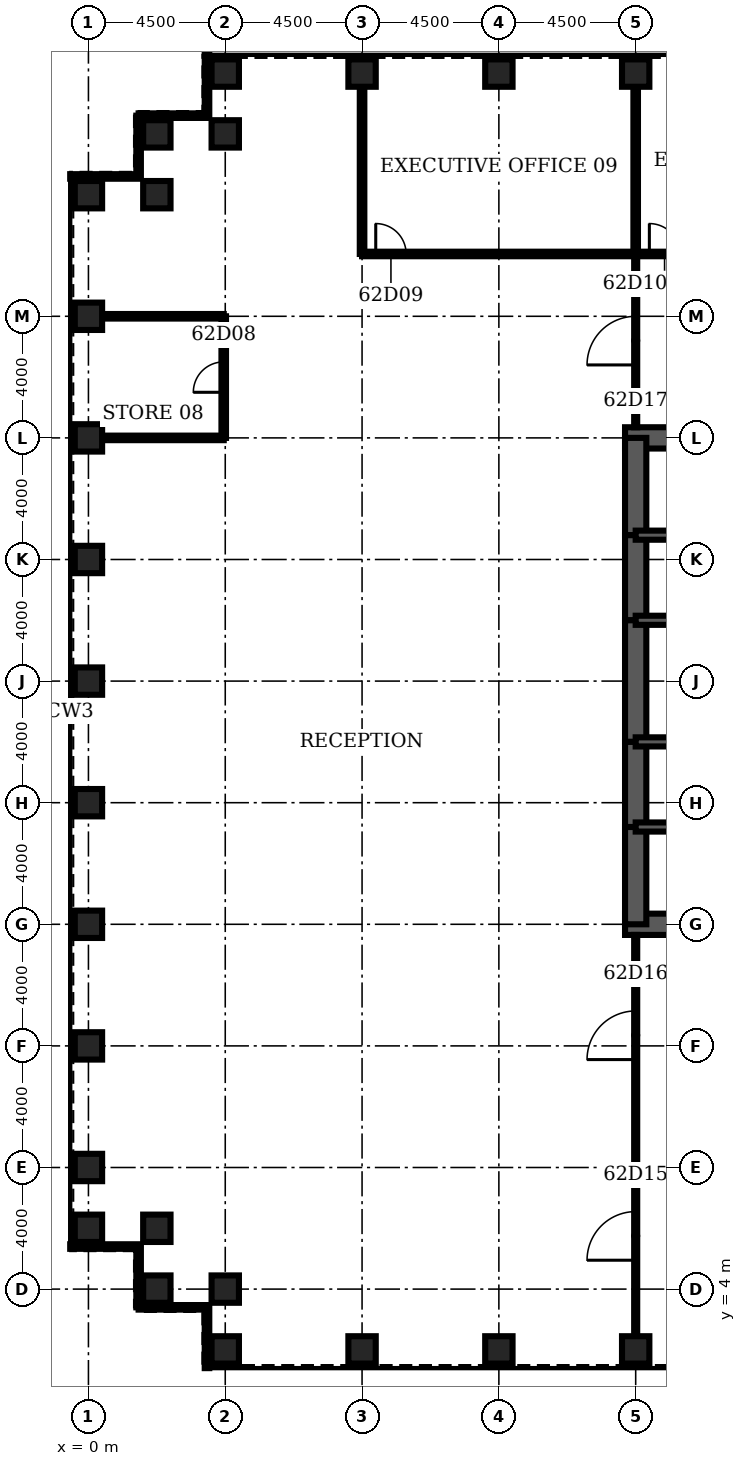
"""IFC4 building model, lengths in metres.
Left out: names, types, materials, properties, quantities, classifications, styles, units other than length and angle.
Written with IfcOpenShell. Run it as: python <this file> out.ifc"""

import sys

from ifc_helpers import new_model, si_unit, direction, frame, frame_2d, origin, origin_2d, place, context, subcontext, project, spatial, rectangle, hollow_rectangle, extrude, element, fill, save


model = new_model("IFC4")
c1 = context("Model", 3, precision=1e-05, world=origin(), true_north=direction((0.0, 1.0)))
c2 = subcontext(c1, "Body", "Model", "MODEL_VIEW")
j1 = project(units=[si_unit("LENGTHUNIT", "METRE"), si_unit("PLANEANGLEUNIT", "RADIAN")], contexts=[c1])
p1 = place(None, origin())
s1 = spatial("IfcSite", under=j1, at=p1, CompositionType="ELEMENT")
p2 = place(p1, origin())
s2 = spatial("IfcBuilding", under=s1, at=p2, CompositionType="ELEMENT")
p3 = place(p2, frame((0.0, 0.0, 275.3)))
s3 = spatial("IfcBuildingStorey", under=s2, at=p3, CompositionType="ELEMENT", Elevation=275.3)
for number, where, z_axis, x_axis in (
    (1, (4.5, 2.0, 0.0), (0.0, 0.0, 1.0), (0.0, 1.0, 0.0)),
    (2, (9.0, 2.0, 0.0), (0.0, 0.0, 1.0), (0.0, 1.0, 0.0)),
    (3, (13.5, 2.0, 0.0), (0.0, 0.0, 1.0), (0.0, 1.0, 0.0)),
    (4, (18.0, 2.0, 0.0), (0.0, 0.0, 1.0), (0.0, 1.0, 0.0)),
    (5, (18.0, 44.0, 0.0), (0.0, 0.0, 1.0), (0.0, 1.0, 0.0)),
    (6, (13.5, 44.0, 0.0), (0.0, 0.0, 1.0), (0.0, 1.0, 0.0)),
    (7, (9.0, 44.0, 0.0), (0.0, 0.0, 1.0), (0.0, 1.0, 0.0)),
    (8, (4.5, 44.0, 0.0), (0.0, 0.0, 1.0), (0.0, 1.0, 0.0)),
    (9, (4.5, 42.0, 0.0), (0.0, 0.0, 1.0), (0.0, 1.0, 0.0)),
    (10, (2.25, 42.0, 0.0), (0.0, 0.0, 1.0), (1.0, 0.0, 0.0)),
    (11, (2.25, 40.0, 0.0), (0.0, 0.0, 1.0), (1.0, 0.0, 0.0)),
    (12, (0.0, 40.0, 0.0), (0.0, 0.0, 1.0), (1.0, 0.0, 0.0)),
    (13, (0.0, 36.0, 0.0), (0.0, 0.0, 1.0), (1.0, 0.0, 0.0)),
    (14, (0.0, 32.0, 0.0), (0.0, 0.0, 1.0), (1.0, 0.0, 0.0)),
    (15, (0.0, 28.0, 0.0), (0.0, 0.0, 1.0), (1.0, 0.0, 0.0)),
    (16, (0.0, 24.0, 0.0), (0.0, 0.0, 1.0), (1.0, 0.0, 0.0)),
    (17, (0.0, 20.0, 0.0), (0.0, 0.0, 1.0), (1.0, 0.0, 0.0)),
    (18, (0.0, 16.0, 0.0), (0.0, 0.0, 1.0), (1.0, 0.0, 0.0)),
    (19, (0.0, 12.0, 0.0), (0.0, 0.0, 1.0), (1.0, 0.0, 0.0)),
    (20, (0.0, 8.0, 0.0), (0.0, 0.0, 1.0), (1.0, 0.0, 0.0)),
    (21, (0.0, 6.0, 0.0), (0.0, 0.0, 1.0), (1.0, 0.0, 0.0)),
    (22, (2.25, 6.0, 0.0), (0.0, 0.0, 1.0), (1.0, 0.0, 0.0)),
    (23, (2.25, 4.0, 0.0), (0.0, 0.0, 1.0), (1.0, 0.0, 0.0)),
    (24, (4.5, 4.0, 0.0), (0.0, 0.0, 1.0), (0.0, 1.0, 0.0)),
):
    element("IfcColumn", number, at=place(p3, frame(where, z_axis=z_axis, x_axis=x_axis)), inside=s3, PredefinedType="COLUMN", context=c2, shape_type="SweptSolid", body=[
        extrude(hollow_rectangle(XDim=0.9, YDim=0.9, WallThickness=0.07, at=origin_2d()), origin(), (0.0, 0.0, 1.0), 4.2),
    ])
for number, where, z_axis, x_axis in (
    (25, (17.65, 16.0, 0.0), (0.0, 0.0, 1.0), (1.0, 0.0, 0.0)),
    (26, (27.0, 32.0, 0.0), (0.0, 0.0, 1.0), (-1.0, 0.0, 0.0)),
):
    element("IfcWall", number, at=place(p3, frame(where, z_axis=z_axis, x_axis=x_axis)), inside=s3, PredefinedType="SHEAR", context=c2, shape_type="SweptSolid", body=[
        extrude(rectangle(XDim=9.35, YDim=0.7, at=frame_2d((4.675, 0.0))), origin(), (0.0, 0.0, 1.0), 4.2),
    ])
p4 = place(p3, frame((18.0, 32.0, 0.0), z_axis=(0.0, 0.0, 1.0), x_axis=(0.0, -1.0, 0.0)))
e27 = element("IfcWall", 27, at=p4, inside=s3, PredefinedType="SHEAR", context=c2, shape_type="SweptSolid", body=[
    extrude(rectangle(XDim=3.2, YDim=0.7, at=frame_2d((1.6, 0.0))), origin(), (0.0, 0.0, 1.0), 4.2),
])
p5 = place(p3, frame((18.0, 28.8, 0.0), z_axis=(0.0, 0.0, 1.0), x_axis=(0.0, -1.0, 0.0)))
e28 = element("IfcWall", 28, at=p5, inside=s3, PredefinedType="SHEAR", context=c2, shape_type="SweptSolid", body=[
    extrude(rectangle(XDim=2.8, YDim=0.7, at=frame_2d((1.4, 0.0))), origin(), (0.0, 0.0, 1.0), 4.2),
])
p6 = place(p5, frame((0.4, 0.0, 0.0)))
e29 = element("IfcOpeningElement", 29, at=p6, cuts=e28, PredefinedType="OPENING", context=c2, shape_type="SweptSolid", body=[
    extrude(rectangle(XDim=1.8, YDim=2.1, at=frame_2d((0.9, 1.05))), frame((0.0, 0.36, 0.0), z_axis=(0.0, -1.0, 0.0), x_axis=(1.0, 0.0, 0.0)), (0.0, 0.0, 1.0), 0.72),
])
p7 = place(p3, frame((18.0, 26.0, 0.0), z_axis=(0.0, 0.0, 1.0), x_axis=(0.0, -1.0, 0.0)))
e30 = element("IfcWall", 30, at=p7, inside=s3, PredefinedType="SHEAR", context=c2, shape_type="SweptSolid", body=[
    extrude(rectangle(XDim=4.0, YDim=0.7, at=frame_2d((2.0, 0.0))), origin(), (0.0, 0.0, 1.0), 4.2),
])
p8 = place(p3, frame((18.0, 22.0, 0.0), z_axis=(0.0, 0.0, 1.0), x_axis=(0.0, -1.0, 0.0)))
e31 = element("IfcWall", 31, at=p8, inside=s3, PredefinedType="SHEAR", context=c2, shape_type="SweptSolid", body=[
    extrude(rectangle(XDim=2.8, YDim=0.7, at=frame_2d((1.4, 0.0))), origin(), (0.0, 0.0, 1.0), 4.2),
])
p9 = place(p8, frame((0.6, 0.0, 0.0)))
e32 = element("IfcOpeningElement", 32, at=p9, cuts=e31, PredefinedType="OPENING", context=c2, shape_type="SweptSolid", body=[
    extrude(rectangle(XDim=1.8, YDim=2.1, at=frame_2d((0.9, 1.05))), frame((0.0, 0.36, 0.0), z_axis=(0.0, -1.0, 0.0), x_axis=(1.0, 0.0, 0.0)), (0.0, 0.0, 1.0), 0.72),
])
p10 = place(p3, frame((18.0, 19.2, 0.0), z_axis=(0.0, 0.0, 1.0), x_axis=(0.0, -1.0, 0.0)))
e33 = element("IfcWall", 33, at=p10, inside=s3, PredefinedType="SHEAR", context=c2, shape_type="SweptSolid", body=[
    extrude(rectangle(XDim=3.2, YDim=0.7, at=frame_2d((1.6, 0.0))), origin(), (0.0, 0.0, 1.0), 4.2),
])
p11 = place(p3, frame((18.0, 19.2, 0.0), z_axis=(0.0, 0.0, 1.0), x_axis=(1.0, 0.0, 0.0)))
e34 = element("IfcWall", 34, at=p11, inside=s3, PredefinedType="SOLIDWALL", context=c2, shape_type="SweptSolid", body=[
    extrude(rectangle(XDim=9.0, YDim=0.3, at=frame_2d((4.5, 0.0))), origin(), (0.0, 0.0, 1.0), 4.2),
])
p12 = place(p11, frame((0.65, 0.0, 0.0)))
e35 = element("IfcOpeningElement", 35, at=p12, cuts=e34, PredefinedType="OPENING", context=c2, shape_type="SweptSolid", body=[
    extrude(rectangle(XDim=1.0, YDim=2.1, at=frame_2d((0.5, 1.05))), frame((0.0, 0.16, 0.0), z_axis=(0.0, -1.0, 0.0), x_axis=(1.0, 0.0, 0.0)), (0.0, 0.0, 1.0), 0.32),
])
p13 = place(p3, frame((18.0, 28.8, 0.0), z_axis=(0.0, 0.0, 1.0), x_axis=(1.0, 0.0, 0.0)))
e36 = element("IfcWall", 36, at=p13, inside=s3, PredefinedType="SOLIDWALL", context=c2, shape_type="SweptSolid", body=[
    extrude(rectangle(XDim=9.0, YDim=0.3, at=frame_2d((4.5, 0.0))), origin(), (0.0, 0.0, 1.0), 4.2),
])
p14 = place(p13, frame((0.65, 0.0, 0.0)))
e37 = element("IfcOpeningElement", 37, at=p14, cuts=e36, PredefinedType="OPENING", context=c2, shape_type="SweptSolid", body=[
    extrude(rectangle(XDim=1.0, YDim=2.1, at=frame_2d((0.5, 1.05))), frame((0.0, 0.16, 0.0), z_axis=(0.0, -1.0, 0.0), x_axis=(1.0, 0.0, 0.0)), (0.0, 0.0, 1.0), 0.32),
])
p15 = place(p3, frame((18.0, 22.0, 0.0), z_axis=(0.0, 0.0, 1.0), x_axis=(1.0, 0.0, 0.0)))
e38 = element("IfcWall", 38, at=p15, inside=s3, PredefinedType="SOLIDWALL", context=c2, shape_type="SweptSolid", body=[
    extrude(rectangle(XDim=6.0, YDim=0.3, at=frame_2d((3.0, 0.0))), origin(), (0.0, 0.0, 1.0), 4.2),
])
p16 = place(p15, frame((4.4, 0.0, 0.0)))
e39 = element("IfcOpeningElement", 39, at=p16, cuts=e38, PredefinedType="OPENING", context=c2, shape_type="SweptSolid", body=[
    extrude(rectangle(XDim=1.0, YDim=2.1, at=frame_2d((0.5, 1.05))), frame((0.0, 0.16, 0.0), z_axis=(0.0, -1.0, 0.0), x_axis=(1.0, 0.0, 0.0)), (0.0, 0.0, 1.0), 0.32),
])
p17 = place(p15, frame((0.9, 0.0, 0.0)))
e40 = element("IfcOpeningElement", 40, at=p17, cuts=e38, PredefinedType="OPENING", context=c2, shape_type="SweptSolid", body=[
    extrude(rectangle(XDim=1.0, YDim=2.1, at=frame_2d((0.5, 1.05))), frame((0.0, 0.16, 0.0), z_axis=(0.0, -1.0, 0.0), x_axis=(1.0, 0.0, 0.0)), (0.0, 0.0, 1.0), 0.32),
])
p18 = place(p3, frame((18.0, 26.0, 0.0), z_axis=(0.0, 0.0, 1.0), x_axis=(1.0, 0.0, 0.0)))
e41 = element("IfcWall", 41, at=p18, inside=s3, PredefinedType="SOLIDWALL", context=c2, shape_type="SweptSolid", body=[
    extrude(rectangle(XDim=6.0, YDim=0.3, at=frame_2d((3.0, 0.0))), origin(), (0.0, 0.0, 1.0), 4.2),
])
for number, where, z_axis, x_axis in (
    (42, (0.45, 32.0, 0.0), (0.0, 0.0, 1.0), (1.0, 0.0, 0.0)),
    (43, (0.45, 36.0, 0.0), (0.0, 0.0, 1.0), (1.0, 0.0, 0.0)),
):
    element("IfcWall", number, at=place(p3, frame(where, z_axis=z_axis, x_axis=x_axis)), inside=s3, PredefinedType="PARTITIONING", context=c2, shape_type="SweptSolid", body=[
        extrude(rectangle(XDim=4.0, YDim=0.15, at=frame_2d((2.0, 0.0))), origin(), (0.0, 0.0, 1.0), 3.0),
    ])
p19 = place(p3, frame((9.0, 38.05, 0.0), z_axis=(0.0, 0.0, 1.0), x_axis=(1.0, 0.0, 0.0)))
e44 = element("IfcWall", 44, at=p19, inside=s3, PredefinedType="PARTITIONING", context=c2, shape_type="SweptSolid", body=[
    extrude(rectangle(XDim=54.0, YDim=0.15, at=frame_2d((27.0, 0.0))), origin(), (0.0, 0.0, 1.0), 3.0),
])
p20 = place(p19, frame((0.45, 0.0, 0.0)))
e45 = element("IfcOpeningElement", 45, at=p20, cuts=e44, PredefinedType="OPENING", context=c2, shape_type="SweptSolid", body=[
    extrude(rectangle(XDim=1.0, YDim=2.1, at=frame_2d((0.5, 1.05))), frame((0.0, 0.085, 0.0), z_axis=(0.0, -1.0, 0.0), x_axis=(1.0, 0.0, 0.0)), (0.0, 0.0, 1.0), 0.17),
])
p21 = place(p19, frame((9.45, 0.0, 0.0)))
e46 = element("IfcOpeningElement", 46, at=p21, cuts=e44, PredefinedType="OPENING", context=c2, shape_type="SweptSolid", body=[
    extrude(rectangle(XDim=1.0, YDim=2.1, at=frame_2d((0.5, 1.05))), frame((0.0, 0.085, 0.0), z_axis=(0.0, -1.0, 0.0), x_axis=(1.0, 0.0, 0.0)), (0.0, 0.0, 1.0), 0.17),
])
p22 = place(p19, frame((18.45, 0.0, 0.0)))
e47 = element("IfcOpeningElement", 47, at=p22, cuts=e44, PredefinedType="OPENING", context=c2, shape_type="SweptSolid", body=[
    extrude(rectangle(XDim=1.0, YDim=2.1, at=frame_2d((0.5, 1.05))), frame((0.0, 0.085, 0.0), z_axis=(0.0, -1.0, 0.0), x_axis=(1.0, 0.0, 0.0)), (0.0, 0.0, 1.0), 0.17),
])
p23 = place(p19, frame((27.45, 0.0, 0.0)))
e48 = element("IfcOpeningElement", 48, at=p23, cuts=e44, PredefinedType="OPENING", context=c2, shape_type="SweptSolid", body=[
    extrude(rectangle(XDim=1.0, YDim=2.1, at=frame_2d((0.5, 1.05))), frame((0.0, 0.085, 0.0), z_axis=(0.0, -1.0, 0.0), x_axis=(1.0, 0.0, 0.0)), (0.0, 0.0, 1.0), 0.17),
])
p24 = place(p19, frame((36.45, 0.0, 0.0)))
e49 = element("IfcOpeningElement", 49, at=p24, cuts=e44, PredefinedType="OPENING", context=c2, shape_type="SweptSolid", body=[
    extrude(rectangle(XDim=1.0, YDim=2.1, at=frame_2d((0.5, 1.05))), frame((0.0, 0.085, 0.0), z_axis=(0.0, -1.0, 0.0), x_axis=(1.0, 0.0, 0.0)), (0.0, 0.0, 1.0), 0.17),
])
p25 = place(p19, frame((45.45, 0.0, 0.0)))
e50 = element("IfcOpeningElement", 50, at=p25, cuts=e44, PredefinedType="OPENING", context=c2, shape_type="SweptSolid", body=[
    extrude(rectangle(XDim=1.0, YDim=2.1, at=frame_2d((0.5, 1.05))), frame((0.0, 0.085, 0.0), z_axis=(0.0, -1.0, 0.0), x_axis=(1.0, 0.0, 0.0)), (0.0, 0.0, 1.0), 0.17),
])
p26 = place(p3, frame((4.45, 32.0, 0.0), z_axis=(0.0, 0.0, 1.0), x_axis=(0.0, 1.0, 0.0)))
e51 = element("IfcWall", 51, at=p26, inside=s3, PredefinedType="PARTITIONING", context=c2, shape_type="SweptSolid", body=[
    extrude(rectangle(XDim=4.0, YDim=0.15, at=frame_2d((2.0, 0.0))), origin(), (0.0, 0.0, 1.0), 3.0),
])
p27 = place(p26, frame((1.5, 0.0, 0.0)))
e52 = element("IfcOpeningElement", 52, at=p27, cuts=e51, PredefinedType="OPENING", context=c2, shape_type="SweptSolid", body=[
    extrude(rectangle(XDim=1.0, YDim=2.1, at=frame_2d((0.5, 1.05))), frame((0.0, 0.085, 0.0), z_axis=(0.0, -1.0, 0.0), x_axis=(1.0, 0.0, 0.0)), (0.0, 0.0, 1.0), 0.17),
])
p28 = place(p3, frame((9.0, 38.05, 0.0), z_axis=(0.0, 0.0, 1.0), x_axis=(0.0, 1.0, 0.0)))
e53 = element("IfcWall", 53, at=p28, inside=s3, PredefinedType="PARTITIONING", context=c2, shape_type="SweptSolid", body=[
    extrude(rectangle(XDim=5.5, YDim=0.15, at=frame_2d((2.75, 0.0))), origin(), (0.0, 0.0, 1.0), 3.0),
])
p29 = place(p3, frame((18.0, 2.45, 0.0), z_axis=(0.0, 0.0, 1.0), x_axis=(0.0, 1.0, 0.0)))
e54 = element("IfcWall", 54, at=p29, inside=s3, PredefinedType="PARTITIONING", context=c2, shape_type="SweptSolid", body=[
    extrude(rectangle(XDim=13.2, YDim=0.1, at=frame_2d((6.6, 0.0))), origin(), (0.0, 0.0, 1.0), 3.0),
])
p30 = place(p29, frame((2.5, 0.0, 0.0)))
e55 = element("IfcOpeningElement", 55, at=p30, cuts=e54, PredefinedType="OPENING", context=c2, shape_type="SweptSolid", body=[
    extrude(rectangle(XDim=1.6, YDim=2.1, at=frame_2d((0.8, 1.05))), frame((0.0, 0.06, 0.0), z_axis=(0.0, -1.0, 0.0), x_axis=(1.0, 0.0, 0.0)), (0.0, 0.0, 1.0), 0.12),
])
p31 = place(p29, frame((9.1, 0.0, 0.0)))
e56 = element("IfcOpeningElement", 56, at=p31, cuts=e54, PredefinedType="OPENING", context=c2, shape_type="SweptSolid", body=[
    extrude(rectangle(XDim=1.6, YDim=2.1, at=frame_2d((0.8, 1.05))), frame((0.0, 0.06, 0.0), z_axis=(0.0, -1.0, 0.0), x_axis=(1.0, 0.0, 0.0)), (0.0, 0.0, 1.0), 0.12),
])
p32 = place(p3, frame((18.0, 32.35, 0.0), z_axis=(0.0, 0.0, 1.0), x_axis=(0.0, 1.0, 0.0)))
e57 = element("IfcWall", 57, at=p32, inside=s3, PredefinedType="PARTITIONING", context=c2, shape_type="SweptSolid", body=[
    extrude(rectangle(XDim=5.7, YDim=0.1, at=frame_2d((2.85, 0.0))), origin(), (0.0, 0.0, 1.0), 3.0),
])
p33 = place(p32, frame((2.05, 0.0, 0.0)))
e58 = element("IfcOpeningElement", 58, at=p33, cuts=e57, PredefinedType="OPENING", context=c2, shape_type="SweptSolid", body=[
    extrude(rectangle(XDim=1.6, YDim=2.1, at=frame_2d((0.8, 1.05))), frame((0.0, 0.06, 0.0), z_axis=(0.0, -1.0, 0.0), x_axis=(1.0, 0.0, 0.0)), (0.0, 0.0, 1.0), 0.12),
])
p34 = place(p3, frame((18.0, 38.05, 0.0), z_axis=(0.0, 0.0, 1.0), x_axis=(0.0, 1.0, 0.0)))
e59 = element("IfcWall", 59, at=p34, inside=s3, PredefinedType="PARTITIONING", context=c2, shape_type="SweptSolid", body=[
    extrude(rectangle(XDim=5.5, YDim=0.15, at=frame_2d((2.75, 0.0))), origin(), (0.0, 0.0, 1.0), 3.0),
])
p35 = place(p3, frame((3.9, 44.6, 0.0), z_axis=(0.0, 0.0, 1.0), x_axis=(0.0, -1.0, 0.0)))
e60 = element("IfcWall", 60, at=p35, inside=s3, PredefinedType="ELEMENTEDWALL", context=c2, shape_type="SweptSolid", body=[
    extrude(rectangle(XDim=2.0, YDim=0.15, at=frame_2d((1.0, 0.0))), origin(), (0.0, 0.0, 1.0), 4.04),
])
p36 = place(p3, frame((3.9, 42.6, 0.0), z_axis=(0.0, 0.0, 1.0), x_axis=(-1.0, 0.0, 0.0)))
e61 = element("IfcWall", 61, at=p36, inside=s3, PredefinedType="ELEMENTEDWALL", context=c2, shape_type="SweptSolid", body=[
    extrude(rectangle(XDim=2.25, YDim=0.15, at=frame_2d((1.125, 0.0))), origin(), (0.0, 0.0, 1.0), 4.04),
])
p37 = place(p3, frame((1.65, 42.6, 0.0), z_axis=(0.0, 0.0, 1.0), x_axis=(0.0, -1.0, 0.0)))
e62 = element("IfcWall", 62, at=p37, inside=s3, PredefinedType="ELEMENTEDWALL", context=c2, shape_type="SweptSolid", body=[
    extrude(rectangle(XDim=2.0, YDim=0.15, at=frame_2d((1.0, 0.0))), origin(), (0.0, 0.0, 1.0), 4.04),
])
for number, where, z_axis, x_axis in (
    (63, (1.65, 40.6, 0.0), (0.0, 0.0, 1.0), (-1.0, 0.0, 0.0)),
    (64, (-0.6, 5.4, 0.0), (0.0, 0.0, 1.0), (1.0, 0.0, 0.0)),
):
    element("IfcWall", number, at=place(p3, frame(where, z_axis=z_axis, x_axis=x_axis)), inside=s3, PredefinedType="ELEMENTEDWALL", context=c2, shape_type="SweptSolid", body=[
        extrude(rectangle(XDim=2.25, YDim=0.15, at=frame_2d((1.125, 0.0))), origin(), (0.0, 0.0, 1.0), 4.04),
    ])
p38 = place(p3, frame((1.65, 5.4, 0.0), z_axis=(0.0, 0.0, 1.0), x_axis=(0.0, -1.0, 0.0)))
e65 = element("IfcWall", 65, at=p38, inside=s3, PredefinedType="ELEMENTEDWALL", context=c2, shape_type="SweptSolid", body=[
    extrude(rectangle(XDim=2.0, YDim=0.15, at=frame_2d((1.0, 0.0))), origin(), (0.0, 0.0, 1.0), 4.04),
])
p39 = place(p3, frame((1.65, 3.4, 0.0), z_axis=(0.0, 0.0, 1.0), x_axis=(1.0, 0.0, 0.0)))
e66 = element("IfcWall", 66, at=p39, inside=s3, PredefinedType="ELEMENTEDWALL", context=c2, shape_type="SweptSolid", body=[
    extrude(rectangle(XDim=2.25, YDim=0.15, at=frame_2d((1.125, 0.0))), origin(), (0.0, 0.0, 1.0), 4.04),
])
p40 = place(p3, frame((3.9, 3.4, 0.0), z_axis=(0.0, 0.0, 1.0), x_axis=(0.0, -1.0, 0.0)))
e67 = element("IfcWall", 67, at=p40, inside=s3, PredefinedType="ELEMENTEDWALL", context=c2, shape_type="SweptSolid", body=[
    extrude(rectangle(XDim=2.0, YDim=0.15, at=frame_2d((1.0, 0.0))), origin(), (0.0, 0.0, 1.0), 4.04),
])
p41 = place(p27, origin())
e68 = element("IfcDoor", 68, at=p41, inside=s3, OperationType="SINGLE_SWING_LEFT", PredefinedType="DOOR", context=c2, shape_type="SweptSolid", body=[
    extrude(rectangle(XDim=1.0, YDim=2.1, at=frame_2d((0.5, 1.05))), frame((0.0, 0.025, 0.0), z_axis=(0.0, -1.0, 0.0), x_axis=(1.0, 0.0, 0.0)), (0.0, 0.0, 1.0), 0.05),
])
fill(e52, e68)
p42 = place(p20, origin())
e69 = element("IfcDoor", 69, at=p42, inside=s3, OperationType="SINGLE_SWING_LEFT", PredefinedType="DOOR", context=c2, shape_type="SweptSolid", body=[
    extrude(rectangle(XDim=1.0, YDim=2.1, at=frame_2d((0.5, 1.05))), frame((0.0, 0.025, 0.0), z_axis=(0.0, -1.0, 0.0), x_axis=(1.0, 0.0, 0.0)), (0.0, 0.0, 1.0), 0.05),
])
fill(e45, e69)
p43 = place(p21, origin())
e70 = element("IfcDoor", 70, at=p43, inside=s3, OperationType="SINGLE_SWING_LEFT", PredefinedType="DOOR", context=c2, shape_type="SweptSolid", body=[
    extrude(rectangle(XDim=1.0, YDim=2.1, at=frame_2d((0.5, 1.05))), frame((0.0, 0.025, 0.0), z_axis=(0.0, -1.0, 0.0), x_axis=(1.0, 0.0, 0.0)), (0.0, 0.0, 1.0), 0.05),
])
fill(e46, e70)
p44 = place(p30, origin())
e71 = element("IfcDoor", 71, at=p44, inside=s3, OperationType="SINGLE_SWING_LEFT", PredefinedType="DOOR", context=c2, shape_type="SweptSolid", body=[
    extrude(rectangle(XDim=1.6, YDim=2.1, at=frame_2d((0.8, 1.05))), frame((0.0, 0.025, 0.0), z_axis=(0.0, -1.0, 0.0), x_axis=(1.0, 0.0, 0.0)), (0.0, 0.0, 1.0), 0.05),
])
fill(e55, e71)
p45 = place(p31, origin())
e72 = element("IfcDoor", 72, at=p45, inside=s3, OperationType="SINGLE_SWING_LEFT", PredefinedType="DOOR", context=c2, shape_type="SweptSolid", body=[
    extrude(rectangle(XDim=1.6, YDim=2.1, at=frame_2d((0.8, 1.05))), frame((0.0, 0.025, 0.0), z_axis=(0.0, -1.0, 0.0), x_axis=(1.0, 0.0, 0.0)), (0.0, 0.0, 1.0), 0.05),
])
fill(e56, e72)
p46 = place(p33, origin())
e73 = element("IfcDoor", 73, at=p46, inside=s3, OperationType="SINGLE_SWING_LEFT", PredefinedType="DOOR", context=c2, shape_type="SweptSolid", body=[
    extrude(rectangle(XDim=1.6, YDim=2.1, at=frame_2d((0.8, 1.05))), frame((0.0, 0.025, 0.0), z_axis=(0.0, -1.0, 0.0), x_axis=(1.0, 0.0, 0.0)), (0.0, 0.0, 1.0), 0.05),
])
fill(e58, e73)
p47 = place(p12, origin())
e74 = element("IfcDoor", 74, at=p47, inside=s3, OperationType="SINGLE_SWING_LEFT", PredefinedType="DOOR", context=c2, shape_type="SweptSolid", body=[
    extrude(rectangle(XDim=1.0, YDim=2.1, at=frame_2d((0.5, 1.05))), frame((0.0, 0.025, 0.0), z_axis=(0.0, -1.0, 0.0), x_axis=(1.0, 0.0, 0.0)), (0.0, 0.0, 1.0), 0.05),
])
fill(e35, e74)
p48 = place(p14, origin())
e75 = element("IfcDoor", 75, at=p48, inside=s3, OperationType="SINGLE_SWING_LEFT", PredefinedType="DOOR", context=c2, shape_type="SweptSolid", body=[
    extrude(rectangle(XDim=1.0, YDim=2.1, at=frame_2d((0.5, 1.05))), frame((0.0, 0.025, 0.0), z_axis=(0.0, -1.0, 0.0), x_axis=(1.0, 0.0, 0.0)), (0.0, 0.0, 1.0), 0.05),
])
fill(e37, e75)
p49 = place(p9, origin())
e76 = element("IfcDoor", 76, at=p49, inside=s3, OperationType="SINGLE_SWING_LEFT", PredefinedType="DOOR", context=c2, shape_type="SweptSolid", body=[
    extrude(rectangle(XDim=1.8, YDim=2.1, at=frame_2d((0.9, 1.05))), frame((0.0, 0.35, 0.0), z_axis=(0.0, -1.0, 0.0), x_axis=(1.0, 0.0, 0.0)), (0.0, 0.0, 1.0), 0.699),
])
fill(e32, e76)
p50 = place(p6, origin())
e77 = element("IfcDoor", 77, at=p50, inside=s3, OperationType="SINGLE_SWING_LEFT", PredefinedType="DOOR", context=c2, shape_type="SweptSolid", body=[
    extrude(rectangle(XDim=1.8, YDim=2.1, at=frame_2d((0.9, 1.05))), frame((0.0, 0.35, 0.0), z_axis=(0.0, -1.0, 0.0), x_axis=(1.0, 0.0, 0.0)), (0.0, 0.0, 1.0), 0.699),
])
fill(e29, e77)
p51 = place(p17, origin())
e78 = element("IfcDoor", 78, at=p51, inside=s3, OperationType="SINGLE_SWING_LEFT", PredefinedType="DOOR", context=c2, shape_type="SweptSolid", body=[
    extrude(rectangle(XDim=1.0, YDim=2.1, at=frame_2d((0.5, 1.05))), frame((0.0, 0.025, 0.0), z_axis=(0.0, -1.0, 0.0), x_axis=(1.0, 0.0, 0.0)), (0.0, 0.0, 1.0), 0.05),
])
fill(e40, e78)
save(model, sys.argv[1])
